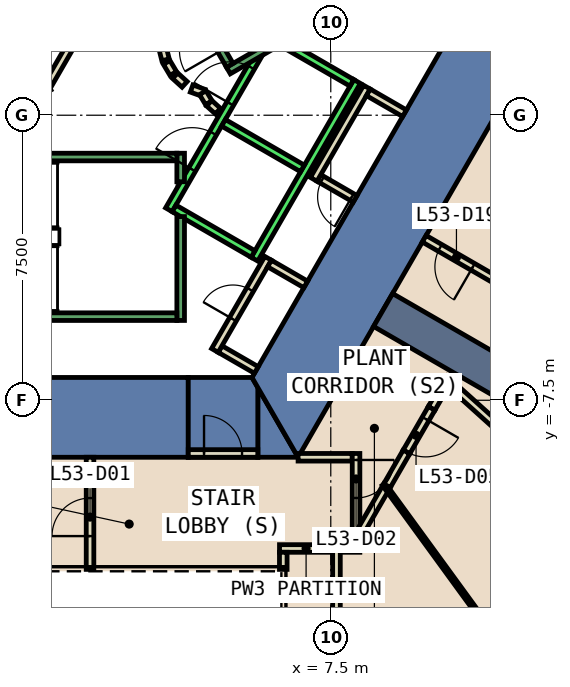
"""IFC4 building model, lengths in metres.
Left out: names, types, materials, properties, quantities, classifications, styles, units other than length and angle.
Written with IfcOpenShell. Run it as: python <this file> out.ifc"""

import sys

from ifc_helpers import new_model, si_unit, direction, frame, frame_2d, origin, place, context, subcontext, project, spatial, polyline, rectangle, outline, extrude, element, fill, save


model = new_model("IFC4")
c1 = context("Model", 3, precision=1e-05, world=origin(), true_north=direction((0.0, 1.0)))
c2 = subcontext(c1, "Body", "Model", "MODEL_VIEW")
j1 = project(units=[si_unit("LENGTHUNIT", "METRE"), si_unit("PLANEANGLEUNIT", "RADIAN")], contexts=[c1])
p1 = place(None, origin())
s1 = spatial("IfcSite", under=j1, at=p1, CompositionType="ELEMENT")
p2 = place(p1, origin())
s2 = spatial("IfcBuilding", under=s1, at=p2, CompositionType="ELEMENT")
p3 = place(p2, frame((0.0, 0.0, 236.0)))
s3 = spatial("IfcBuildingStorey", under=s2, at=p3, CompositionType="ELEMENT", Elevation=236.0)
p4 = place(p3, frame((0.0, 0.0, -0.6)))
e1 = element("IfcWall", 1, at=p4, inside=s3, PredefinedType="SHEAR", context=c2, shape_type="SweptSolid", body=[
    extrude(outline(polyline([(3.75, -9.0), (3.75, -6.9), (-5.427, -6.9), (-6.64, -9.0), (3.75, -9.0)])), origin(), (0.0, 0.0, 1.0), 5.4),
])
p5 = place(p3, frame((0.0, 0.0, -0.6)))
e2 = element("IfcWall", 2, at=p5, inside=s3, PredefinedType="SHEAR", context=c2, shape_type="SweptSolid", body=[
    extrude(outline(polyline([(5.58, -7.165), (5.58, -9.0), (6.64, -9.0), (5.58, -7.165)])), origin(), (0.0, 0.0, 1.0), 5.4),
])
p6 = place(p3, frame((0.0, 0.0, 3.6)))
e3 = element("IfcWall", 3, at=p6, inside=s3, PredefinedType="SHEAR", context=c2, shape_type="SweptSolid", body=[
    extrude(outline(polyline([(5.58, -9.0), (5.58, -7.165), (5.427, -6.9), (3.75, -6.9), (3.75, -9.0), (5.58, -9.0)])), origin(), (0.0, 0.0, 1.0), 1.2),
])
p7 = place(p3, frame((0.0, 0.0, -0.6)))
e4 = element("IfcWall", 4, at=p7, inside=s3, PredefinedType="SHEAR", context=c2, shape_type="SweptSolid", body=[
    extrude(outline(polyline([(6.64, -9.0), (13.279, 2.5), (10.854, 2.5), (5.427, -6.9), (6.64, -9.0)])), origin(), (0.0, 0.0, 1.0), 5.4),
])
p8 = place(p3, frame((8.877, -5.125, 0.0), z_axis=(0.0, 0.0, 1.0), x_axis=(0.866032640494, -0.499987465442, 0.0)))
e5 = element("IfcWall", 5, at=p8, inside=s3, PredefinedType="SHEAR", context=c2, shape_type="SweptSolid", body=[
    extrude(rectangle(XDim=23.232, YDim=1.0, at=frame_2d((11.616, 0.0))), origin(), (0.0, 0.0, 1.0), 4.8),
])
p9 = place(p3, frame((5.541, -6.703, 0.0), z_axis=(0.0, 0.0, 1.0), x_axis=(-0.86621513555, 0.499671230855, 0.0)))
e6 = element("IfcWall", 6, at=p9, inside=s3, PredefinedType="PARTITIONING", context=c2, shape_type="SweptSolid", body=[
    extrude(rectangle(XDim=1.1, YDim=0.2, at=frame_2d((0.55, 0.0))), origin(), (0.0, 0.0, 1.0), 4.8),
])
p10 = place(p3, frame((4.451, -6.19, 0.0), z_axis=(0.0, 0.0, 1.0), x_axis=(0.500011755427, 0.866018616679, 0.0)))
e7 = element("IfcWall", 7, at=p10, inside=s3, PredefinedType="PARTITIONING", context=c2, shape_type="SweptSolid", body=[
    extrude(rectangle(XDim=2.8, YDim=0.2, at=frame_2d((1.4, 0.0))), origin(), (0.0, 0.0, 1.0), 4.8),
])
p11 = place(p10, frame((0.95, 0.0, 0.0)))
e8 = element("IfcOpeningElement", 8, at=p11, cuts=e7, PredefinedType="OPENING", context=c2, shape_type="SweptSolid", body=[
    extrude(rectangle(XDim=0.9, YDim=2.1, at=frame_2d((0.45, 1.05))), frame((0.0, 0.11, 0.0), z_axis=(0.0, -1.0, 0.0), x_axis=(1.0, 0.0, 0.0)), (0.0, 0.0, 1.0), 0.22),
])
p12 = place(p3, frame((5.888, -3.902, 0.0), z_axis=(0.0, 0.0, 1.0), x_axis=(0.86621513555, -0.499671230855, 0.0)))
e9 = element("IfcWall", 9, at=p12, inside=s3, PredefinedType="PARTITIONING", context=c2, shape_type="SweptSolid", body=[
    extrude(rectangle(XDim=1.1, YDim=0.2, at=frame_2d((0.55, 0.0))), origin(), (0.0, 0.0, 1.0), 4.8),
])
p13 = place(p3, frame((8.14, -2.2, 0.0), z_axis=(0.0, 0.0, 1.0), x_axis=(-0.865841558281, 0.500318294642, 0.0)))
e10 = element("IfcWall", 10, at=p13, inside=s3, PredefinedType="PARTITIONING", context=c2, shape_type="SweptSolid", body=[
    extrude(rectangle(XDim=1.099, YDim=0.2, at=frame_2d((0.55, 0.0))), origin(), (0.0, 0.0, 1.0), 4.8),
])
p14 = place(p13, frame((0.1, 0.0, 0.0)))
e11 = element("IfcOpeningElement", 11, at=p14, cuts=e10, PredefinedType="OPENING", context=c2, shape_type="SweptSolid", body=[
    extrude(rectangle(XDim=0.9, YDim=2.1, at=frame_2d((0.45, 1.05))), frame((0.0, 0.11, 0.0), z_axis=(0.0, -1.0, 0.0), x_axis=(1.0, 0.0, 0.0)), (0.0, 0.0, 1.0), 0.22),
])
p15 = place(p3, frame((7.051, -1.687, 0.0), z_axis=(0.0, 0.0, 1.0), x_axis=(0.49994636267, 0.866056369097, 0.0)))
e12 = element("IfcWall", 12, at=p15, inside=s3, PredefinedType="PARTITIONING", context=c2, shape_type="SweptSolid", body=[
    extrude(rectangle(XDim=2.8, YDim=0.2, at=frame_2d((1.4, 0.0))), origin(), (0.0, 0.0, 1.0), 4.8),
])
p16 = place(p3, frame((8.488, 0.602, 0.0), z_axis=(0.0, 0.0, 1.0), x_axis=(0.866063652425, -0.499933745558, 0.0)))
e13 = element("IfcWall", 13, at=p16, inside=s3, PredefinedType="PARTITIONING", context=c2, shape_type="SweptSolid", body=[
    extrude(rectangle(XDim=1.1, YDim=0.2, at=frame_2d((0.55, 0.0))), origin(), (0.0, 0.0, 1.0), 4.8),
])
p17 = place(p3, frame((3.07, 1.786, 0.0), z_axis=(0.0, 0.0, 1.0), x_axis=(0.242705583207, -0.970099994784, 0.0)))
e14 = element("IfcWall", 14, at=p17, inside=s3, PredefinedType="PARTITIONING", context=c2, shape_type="SweptSolid", body=[
    extrude(rectangle(XDim=0.338, YDim=0.2, at=frame_2d((0.169, 0.0))), origin(), (0.0, 0.0, 1.0), 4.8),
])
for number, where, z_axis, x_axis in (
    (15, (3.182, 1.388, 0.0), (0.0, 0.0, 1.0), (0.512, -0.859, 0.0)),
    (16, (3.404, 1.039, 0.0), (0.0, 0.0, 1.0), (0.74, -0.672, 0.0)),
):
    element("IfcWall", number, at=place(p3, frame(where, z_axis=z_axis, x_axis=x_axis)), inside=s3, PredefinedType="PARTITIONING", context=c2, shape_type="SweptSolid", body=[
        extrude(rectangle(XDim=0.338, YDim=0.2, at=frame_2d((0.169, 0.0))), origin(), (0.0, 0.0, 1.0), 4.8),
    ])
p18 = place(p3, frame((3.838, 0.702, 0.0), z_axis=(0.0, 0.0, 1.0), x_axis=(0.941035081519, -0.338308993895, 0.0)))
e17 = element("IfcWall", 17, at=p18, inside=s3, PredefinedType="PARTITIONING", context=c2, shape_type="SweptSolid", body=[
    extrude(rectangle(XDim=0.337, YDim=0.2, at=frame_2d((0.168, 0.0))), origin(), (0.0, 0.0, 1.0), 4.8),
])
p19 = place(p3, frame((4.132, 0.593, 0.0), z_axis=(0.0, 0.0, 1.0), x_axis=(0.513561617048, -0.858052717201, 0.0)))
e18 = element("IfcWall", 18, at=p19, inside=s3, PredefinedType="PARTITIONING", context=c2, shape_type="SweptSolid", body=[
    extrude(rectangle(XDim=0.308, YDim=0.2, at=frame_2d((0.154, 0.0))), origin(), (0.0, 0.0, 1.0), 4.8),
])
p20 = place(p3, frame((4.301, 0.315, 0.0), z_axis=(0.0, 0.0, 1.0), x_axis=(0.741798017506, -0.670623367639, 0.0)))
e19 = element("IfcWall", 19, at=p20, inside=s3, PredefinedType="PARTITIONING", context=c2, shape_type="SweptSolid", body=[
    extrude(rectangle(XDim=0.309, YDim=0.2, at=frame_2d((0.154, 0.0))), origin(), (0.0, 0.0, 1.0), 4.8),
])
p21 = place(p3, frame((0.05, 0.787, 0.0), z_axis=(0.0, 0.0, 1.0), x_axis=(0.499954076797, 0.866051915934, 0.0)))
e20 = element("IfcWall", 20, at=p21, inside=s3, PredefinedType="PARTITIONING", context=c2, shape_type="SweptSolid", body=[
    extrude(rectangle(XDim=3.558, YDim=0.2, at=frame_2d((1.779, 0.0))), origin(), (0.0, 0.0, 1.0), 4.8),
])
p22 = place(p21, frame((1.229, 0.0, 0.0)))
e21 = element("IfcOpeningElement", 21, at=p22, cuts=e20, PredefinedType="OPENING", context=c2, shape_type="SweptSolid", body=[
    extrude(rectangle(XDim=1.0, YDim=2.1, at=frame_2d((0.5, 1.05))), frame((0.0, 0.11, 0.0), z_axis=(0.0, -1.0, 0.0), x_axis=(1.0, 0.0, 0.0)), (0.0, 0.0, 1.0), 0.22),
])
p23 = place(p3, frame((1.165, -11.95, 0.0), z_axis=(0.0, 0.0, 1.0), x_axis=(0.0, 1.0, 0.0)))
e22 = element("IfcWall", 22, at=p23, inside=s3, PredefinedType="PARTITIONING", context=c2, shape_type="SweptSolid", body=[
    extrude(rectangle(XDim=2.95, YDim=0.2, at=frame_2d((1.475, 0.0))), origin(), (0.0, 0.0, 1.0), 4.8),
])
p24 = place(p23, frame((0.876, 0.0, 0.0)))
e23 = element("IfcOpeningElement", 23, at=p24, cuts=e22, PredefinedType="OPENING", context=c2, shape_type="SweptSolid", body=[
    extrude(rectangle(XDim=1.0, YDim=2.1, at=frame_2d((0.5, 1.05))), frame((0.0, 0.11, 0.0), z_axis=(0.0, -1.0, 0.0), x_axis=(1.0, 0.0, 0.0)), (0.0, 0.0, 1.0), 0.22),
])
p25 = place(p3, frame((7.55, -11.4, 0.0), z_axis=(0.0, 0.0, 1.0), x_axis=(-1.0, 0.0, 0.0)))
e24 = element("IfcWall", 24, at=p25, inside=s3, PredefinedType="PARTITIONING", context=c2, shape_type="SweptSolid", body=[
    extrude(rectangle(XDim=1.399, YDim=0.2, at=frame_2d((0.7, 0.0))), origin(), (0.0, 0.0, 1.0), 4.8),
])
p26 = place(p3, frame((6.25, -11.5, 0.0), z_axis=(0.0, 0.0, 1.0), x_axis=(0.0, -1.0, 0.0)))
e25 = element("IfcWall", 25, at=p26, inside=s3, PredefinedType="PARTITIONING", context=c2, shape_type="SweptSolid", body=[
    extrude(rectangle(XDim=0.45, YDim=0.2, at=frame_2d((0.225, 0.0))), origin(), (0.0, 0.0, 1.0), 4.8),
])
p27 = place(p3, frame((6.64, -9.0, 0.0), z_axis=(0.0, 0.0, 1.0), x_axis=(1.0, 0.0, 0.0)))
e26 = element("IfcWall", 26, at=p27, inside=s3, PredefinedType="PARTITIONING", context=c2, shape_type="SweptSolid", body=[
    extrude(rectangle(XDim=1.425, YDim=0.2, at=frame_2d((0.712, 0.0))), origin(), (0.0, 0.0, 1.0), 4.8),
])
p28 = place(p3, frame((8.165, -8.9, 0.0), z_axis=(0.0, 0.0, 1.0), x_axis=(0.0, -1.0, 0.0)))
e27 = element("IfcWall", 27, at=p28, inside=s3, PredefinedType="PARTITIONING", context=c2, shape_type="SweptSolid", body=[
    extrude(rectangle(XDim=2.359, YDim=0.2, at=frame_2d((1.18, 0.0))), origin(), (0.0, 0.0, 1.0), 4.8),
])
p29 = place(p28, frame((0.171, 0.0, 0.0)))
e28 = element("IfcOpeningElement", 28, at=p29, cuts=e27, PredefinedType="OPENING", context=c2, shape_type="SweptSolid", body=[
    extrude(rectangle(XDim=1.0, YDim=2.1, at=frame_2d((0.5, 1.05))), frame((0.0, 0.11, 0.0), z_axis=(0.0, -1.0, 0.0), x_axis=(1.0, 0.0, 0.0)), (0.0, 0.0, 1.0), 0.22),
])
p30 = place(p3, frame((8.265, -11.4, 0.0), z_axis=(0.0, 0.0, 1.0), x_axis=(-1.0, 0.0, 0.0)))
e29 = element("IfcWall", 29, at=p30, inside=s3, PredefinedType="PARTITIONING", context=c2, shape_type="SweptSolid", body=[
    extrude(rectangle(XDim=0.515, YDim=0.2, at=frame_2d((0.257, 0.0))), origin(), (0.0, 0.0, 1.0), 4.8),
])
p31 = place(p3, frame((7.65, -11.3, 0.0), z_axis=(0.0, 0.0, 1.0), x_axis=(0.0, -1.0, 0.0)))
e30 = element("IfcWall", 30, at=p31, inside=s3, PredefinedType="PARTITIONING", context=c2, shape_type="SweptSolid", body=[
    extrude(rectangle(XDim=5.465, YDim=0.2, at=frame_2d((2.732, 0.0))), origin(), (0.0, 0.0, 1.0), 4.8),
])
p32 = place(p3, frame((8.98, -9.747, 0.0), z_axis=(0.0, 0.0, 1.0), x_axis=(-0.499908274205, -0.866078355221, 0.0)))
e31 = element("IfcWall", 31, at=p32, inside=s3, PredefinedType="PARTITIONING", context=c2, shape_type="SweptSolid", body=[
    extrude(rectangle(XDim=1.63, YDim=0.2, at=frame_2d((0.815, 0.0))), origin(), (0.0, 0.0, 1.0), 4.8),
])
p33 = place(p3, frame((10.566, -7.0, 0.0), z_axis=(0.0, 0.0, 1.0), x_axis=(-0.500252895651, -0.86587934517, 0.0)))
e32 = element("IfcWall", 32, at=p33, inside=s3, PredefinedType="PARTITIONING", context=c2, shape_type="SweptSolid", body=[
    extrude(rectangle(XDim=0.823, YDim=0.2, at=frame_2d((0.412, 0.0))), origin(), (0.0, 0.0, 1.0), 2.4),
])
p34 = place(p3, frame((8.896, -9.709, 0.0), z_axis=(0.0, 0.0, 1.0), x_axis=(0.588922600502, -0.808189439808, 0.0)))
e33 = element("IfcWall", 33, at=p34, inside=s3, PredefinedType="PARTITIONING", context=c2, shape_type="SweptSolid", body=[
    extrude(rectangle(XDim=16.369, YDim=0.1, at=frame_2d((8.184, 0.0))), origin(), (0.0, 0.0, 1.0), 4.8),
])
p35 = place(p3, frame((10.492, -6.933, 0.0), z_axis=(0.0, 0.0, 1.0), x_axis=(0.743607411776, -0.668616494825, 0.0)))
e34 = element("IfcWall", 34, at=p35, inside=s3, PredefinedType="PARTITIONING", context=c2, shape_type="SweptSolid", body=[
    extrude(rectangle(XDim=9.685, YDim=0.2, at=frame_2d((4.843, 0.0))), origin(), (0.0, 0.0, 1.0), 2.4),
])
p36 = place(p3, frame((11.951, -4.4, 0.0), z_axis=(0.0, 0.0, 1.0), x_axis=(-0.866053019151, 0.499952165731, 0.0)))
e35 = element("IfcWall", 35, at=p36, inside=s3, PredefinedType="PARTITIONING", context=c2, shape_type="SweptSolid", body=[
    extrude(rectangle(XDim=2.3, YDim=0.2, at=frame_2d((1.15, 0.0))), origin(), (0.0, 0.0, 1.0), 4.8),
])
p37 = place(p36, frame((0.821, 0.0, 0.0)))
e36 = element("IfcOpeningElement", 36, at=p37, cuts=e35, PredefinedType="OPENING", context=c2, shape_type="SweptSolid", body=[
    extrude(rectangle(XDim=1.0, YDim=2.1, at=frame_2d((0.5, 1.05))), frame((0.0, 0.11, 0.0), z_axis=(0.0, -1.0, 0.0), x_axis=(1.0, 0.0, 0.0)), (0.0, 0.0, 1.0), 0.22),
])
p38 = place(p3, frame((3.75, -8.9, 0.0), z_axis=(0.0, 0.0, 1.0), x_axis=(1.0, 0.0, 0.0)))
e37 = element("IfcWall", 37, at=p38, inside=s3, PredefinedType="PARTITIONING", context=c2, shape_type="SweptSolid", body=[
    extrude(rectangle(XDim=1.83, YDim=0.2, at=frame_2d((0.915, 0.0))), origin(), (0.0, 0.0, 1.0), 2.4),
])
p39 = place(p38, frame((0.415, 0.0, 0.0)))
e38 = element("IfcOpeningElement", 38, at=p39, cuts=e37, PredefinedType="OPENING", context=c2, shape_type="SweptSolid", body=[
    extrude(rectangle(XDim=1.0, YDim=2.1, at=frame_2d((0.5, 1.05))), frame((0.0, 0.11, 0.0), z_axis=(0.0, -1.0, 0.0), x_axis=(1.0, 0.0, 0.0)), (0.0, 0.0, 1.0), 0.22),
])
p40 = place(p3, frame((10.154, -7.713, 0.0), z_axis=(0.0, 0.0, 1.0), x_axis=(-0.500265304803, -0.865872175792, 0.0)))
e39 = element("IfcWall", 39, at=p40, inside=s3, PredefinedType="PARTITIONING", context=c2, shape_type="SweptSolid", body=[
    extrude(rectangle(XDim=1.323, YDim=0.2, at=frame_2d((0.662, 0.0))), origin(), (0.0, 0.0, 1.0), 4.8),
])
p41 = place(p40, frame((0.32, 0.0, 0.0)))
e40 = element("IfcOpeningElement", 40, at=p41, cuts=e39, PredefinedType="OPENING", context=c2, shape_type="SweptSolid", body=[
    extrude(rectangle(XDim=1.0, YDim=2.1, at=frame_2d((0.5, 1.05))), frame((0.0, 0.11, 0.0), z_axis=(0.0, -1.0, 0.0), x_axis=(1.0, 0.0, 0.0)), (0.0, 0.0, 1.0), 0.22),
])
p42 = place(p3, frame((9.492, -8.859, 0.0), z_axis=(0.0, 0.0, 1.0), x_axis=(-0.499392554388, -0.866375828738, 0.0)))
e41 = element("IfcWall", 41, at=p42, inside=s3, PredefinedType="PARTITIONING", context=c2, shape_type="SweptSolid", body=[
    extrude(rectangle(XDim=1.025, YDim=0.2, at=frame_2d((0.513, 0.0))), origin(), (0.0, 0.0, 1.0), 2.4),
])
p43 = place(p3, frame((3.24, -2.488, 0.0), z_axis=(0.0, 0.0, 1.0), x_axis=(0.500034260056, 0.866005622828, 0.0)))
e42 = element("IfcWall", 42, at=p43, inside=s3, PredefinedType="STANDARD", context=c2, shape_type="SweptSolid", body=[
    extrude(rectangle(XDim=5.399, YDim=0.2, at=frame_2d((2.7, 0.0))), origin(), (0.0, 0.0, 1.0), 4.8),
])
p44 = place(p43, frame((3.225, 0.0, 0.0)))
e43 = element("IfcOpeningElement", 43, at=p44, cuts=e42, PredefinedType="OPENING", context=c2, shape_type="SweptSolid", body=[
    extrude(rectangle(XDim=1.1, YDim=2.1, at=frame_2d((0.55, 1.05))), frame((0.0, 0.11, 0.0), z_axis=(0.0, -1.0, 0.0), x_axis=(1.0, 0.0, 0.0)), (0.0, 0.0, 1.0), 0.22),
])
p45 = place(p43, frame((1.225, 0.0, 0.0)))
e44 = element("IfcOpeningElement", 44, at=p45, cuts=e42, PredefinedType="OPENING", context=c2, shape_type="SweptSolid", body=[
    extrude(rectangle(XDim=1.1, YDim=2.1, at=frame_2d((0.55, 1.05))), frame((0.0, 0.11, 0.0), z_axis=(0.0, -1.0, 0.0), x_axis=(1.0, 0.0, 0.0)), (0.0, 0.0, 1.0), 0.22),
])
p46 = place(p3, frame((5.492, -3.788, 0.0), z_axis=(0.0, 0.0, 1.0), x_axis=(0.500034260056, 0.866005622828, 0.0)))
e45 = element("IfcWall", 45, at=p46, inside=s3, PredefinedType="STANDARD", context=c2, shape_type="SweptSolid", body=[
    extrude(rectangle(XDim=5.399, YDim=0.2, at=frame_2d((2.7, 0.0))), origin(), (0.0, 0.0, 1.0), 4.8),
])
p47 = place(p3, frame((3.377, -2.452, 0.0), z_axis=(0.0, 0.0, 1.0), x_axis=(0.865955154139, -0.50012165622, 0.0)))
e46 = element("IfcWall", 46, at=p47, inside=s3, PredefinedType="STANDARD", context=c2, shape_type="SweptSolid", body=[
    extrude(rectangle(XDim=2.4, YDim=0.2, at=frame_2d((1.2, 0.0))), origin(), (0.0, 0.0, 1.0), 4.8),
])
for number, where, z_axis, x_axis in (
    (47, (4.677, -0.2, 0.0), (0.0, 0.0, 1.0), (0.866, -0.5, 0.0)),
    (48, (5.977, 2.052, 0.0), (0.0, 0.0, 1.0), (0.866, -0.5, 0.0)),
):
    element("IfcWall", number, at=place(p3, frame(where, z_axis=z_axis, x_axis=x_axis)), inside=s3, PredefinedType="STANDARD", context=c2, shape_type="SweptSolid", body=[
        extrude(rectangle(XDim=2.399, YDim=0.2, at=frame_2d((1.2, 0.0))), origin(), (0.0, 0.0, 1.0), 4.8),
    ])
p48 = place(p3, frame((3.55, -2.667, 0.0), z_axis=(0.0, 0.0, 1.0), x_axis=(0.0, -1.0, 0.0)))
e49 = element("IfcWall", 49, at=p48, inside=s3, PredefinedType="STANDARD", context=c2, shape_type="SweptSolid", body=[
    extrude(rectangle(XDim=2.733, YDim=0.2, at=frame_2d((1.366, 0.0))), origin(), (0.0, 0.0, 1.0), 4.8),
])
p49 = place(p3, frame((3.55, -1.0, 0.0), z_axis=(0.0, 0.0, 1.0), x_axis=(0.0, -1.0, 0.0)))
e50 = element("IfcWall", 50, at=p49, inside=s3, PredefinedType="STANDARD", context=c2, shape_type="SweptSolid", body=[
    extrude(rectangle(XDim=0.751, YDim=0.2, at=frame_2d((0.375, 0.0))), origin(), (0.0, 0.0, 1.0), 4.8),
])
p50 = place(p3, frame((-3.45, -1.1, 0.0), z_axis=(0.0, 0.0, 1.0), x_axis=(1.0, 0.0, 0.0)))
e51 = element("IfcWall", 51, at=p50, inside=s3, PredefinedType="STANDARD", context=c2, shape_type="SweptSolid", body=[
    extrude(rectangle(XDim=6.9, YDim=0.2, at=frame_2d((3.45, 0.0))), origin(), (0.0, 0.0, 1.0), 4.8),
])
p51 = place(p50, frame((0.45, 0.0, 0.0)))
e52 = element("IfcOpeningElement", 52, at=p51, cuts=e51, PredefinedType="OPENING", context=c2, shape_type="SweptSolid", body=[
    extrude(rectangle(XDim=1.1, YDim=2.2, at=frame_2d((0.55, 1.1))), frame((0.0, 0.11, 0.0), z_axis=(0.0, -1.0, 0.0), x_axis=(1.0, 0.0, 0.0)), (0.0, 0.0, 1.0), 0.22),
])
p52 = place(p3, frame((-3.45, -5.3, 0.0), z_axis=(0.0, 0.0, 1.0), x_axis=(1.0, 0.0, 0.0)))
e53 = element("IfcWall", 53, at=p52, inside=s3, PredefinedType="STANDARD", context=c2, shape_type="SweptSolid", body=[
    extrude(rectangle(XDim=6.9, YDim=0.2, at=frame_2d((3.45, 0.0))), origin(), (0.0, 0.0, 1.0), 4.8),
])
p53 = place(p3, frame((4.806, 1.176, 0.0), z_axis=(0.0, 0.0, 1.0), x_axis=(0.866059941101, 0.499940174841, 0.0)))
e54 = element("IfcWall", 54, at=p53, inside=s3, PredefinedType="STANDARD", context=c2, shape_type="SweptSolid", body=[
    extrude(rectangle(XDim=4.4, YDim=0.2, at=frame_2d((2.2, 0.0))), origin(), (0.0, 0.0, 1.0), 4.8),
])
p54 = place(p53, frame((2.4, 0.0, 0.0)))
e55 = element("IfcOpeningElement", 55, at=p54, cuts=e54, PredefinedType="OPENING", context=c2, shape_type="SweptSolid", body=[
    extrude(rectangle(XDim=1.1, YDim=2.2, at=frame_2d((0.55, 1.1))), frame((0.0, 0.11, 0.0), z_axis=(0.0, -1.0, 0.0), x_axis=(1.0, 0.0, 0.0)), (0.0, 0.0, 1.0), 0.22),
])
p55 = place(p3, frame((4.843, 1.312, 0.0), z_axis=(0.0, 0.0, 1.0), x_axis=(-0.499963383562, 0.866046543262, 0.0)))
e56 = element("IfcWall", 56, at=p55, inside=s3, PredefinedType="STANDARD", context=c2, shape_type="SweptSolid", body=[
    extrude(rectangle(XDim=6.9, YDim=0.2, at=frame_2d((3.45, 0.0))), origin(), (0.0, 0.0, 1.0), 4.8),
])
p56 = place(p55, frame((0.45, 0.0, 0.0)))
e57 = element("IfcOpeningElement", 57, at=p56, cuts=e56, PredefinedType="OPENING", context=c2, shape_type="SweptSolid", body=[
    extrude(rectangle(XDim=1.1, YDim=2.2, at=frame_2d((0.55, 1.1))), frame((0.0, 0.11, 0.0), z_axis=(0.0, -1.0, 0.0), x_axis=(1.0, 0.0, 0.0)), (0.0, 0.0, 1.0), 0.22),
])
p57 = place(p24, origin())
e58 = element("IfcDoor", 58, at=p57, inside=s3, OperationType="SINGLE_SWING_LEFT", PredefinedType="DOOR", context=c2, shape_type="SweptSolid", body=[
    extrude(rectangle(XDim=1.0, YDim=2.1, at=frame_2d((0.5, 1.05))), frame((0.0, 0.025, 0.0), z_axis=(0.0, -1.0, 0.0), x_axis=(1.0, 0.0, 0.0)), (0.0, 0.0, 1.0), 0.05),
])
fill(e23, e58)
p58 = place(p29, origin())
e59 = element("IfcDoor", 59, at=p58, inside=s3, OperationType="SINGLE_SWING_RIGHT", PredefinedType="DOOR", context=c2, shape_type="SweptSolid", body=[
    extrude(rectangle(XDim=1.0, YDim=2.1, at=frame_2d((0.5, 1.05))), frame((0.0, 0.025, 0.0), z_axis=(0.0, -1.0, 0.0), x_axis=(1.0, 0.0, 0.0)), (0.0, 0.0, 1.0), 0.05),
])
fill(e28, e59)
p59 = place(p41, origin())
e60 = element("IfcDoor", 60, at=p59, inside=s3, OperationType="SINGLE_SWING_LEFT", PredefinedType="DOOR", context=c2, shape_type="SweptSolid", body=[
    extrude(rectangle(XDim=1.0, YDim=2.1, at=frame_2d((0.5, 1.05))), frame((0.0, 0.025, 0.0), z_axis=(0.0, -1.0, 0.0), x_axis=(1.0, 0.0, 0.0)), (0.0, 0.0, 1.0), 0.05),
])
fill(e40, e60)
p60 = place(p37, origin())
e61 = element("IfcDoor", 61, at=p60, inside=s3, OperationType="SINGLE_SWING_LEFT", PredefinedType="DOOR", context=c2, shape_type="SweptSolid", body=[
    extrude(rectangle(XDim=1.0, YDim=2.1, at=frame_2d((0.5, 1.05))), frame((0.0, 0.025, 0.0), z_axis=(0.0, -1.0, 0.0), x_axis=(1.0, 0.0, 0.0)), (0.0, 0.0, 1.0), 0.05),
])
fill(e36, e61)
p61 = place(p11, origin())
e62 = element("IfcDoor", 62, at=p61, inside=s3, OperationType="SINGLE_SWING_LEFT", PredefinedType="DOOR", context=c2, shape_type="SweptSolid", body=[
    extrude(rectangle(XDim=0.9, YDim=2.1, at=frame_2d((0.45, 1.05))), frame((0.0, 0.025, 0.0), z_axis=(0.0, -1.0, 0.0), x_axis=(1.0, 0.0, 0.0)), (0.0, 0.0, 1.0), 0.05),
])
fill(e8, e62)
p62 = place(p14, origin())
e63 = element("IfcDoor", 63, at=p62, inside=s3, OperationType="SINGLE_SWING_RIGHT", PredefinedType="DOOR", context=c2, shape_type="SweptSolid", body=[
    extrude(rectangle(XDim=0.9, YDim=2.1, at=frame_2d((0.45, 1.05))), frame((0.0, 0.025, 0.0), z_axis=(0.0, -1.0, 0.0), x_axis=(1.0, 0.0, 0.0)), (0.0, 0.0, 1.0), 0.05),
])
fill(e11, e63)
p63 = place(p39, origin())
e64 = element("IfcDoor", 64, at=p63, inside=s3, OperationType="SINGLE_SWING_LEFT", PredefinedType="DOOR", context=c2, shape_type="SweptSolid", body=[
    extrude(rectangle(XDim=1.0, YDim=2.1, at=frame_2d((0.5, 1.05))), frame((0.0, 0.025, 0.0), z_axis=(0.0, -1.0, 0.0), x_axis=(1.0, 0.0, 0.0)), (0.0, 0.0, 1.0), 0.05),
])
fill(e38, e64)
p64 = place(p44, origin())
e65 = element("IfcDoor", 65, at=p64, inside=s3, OperationType="SLIDING_TO_LEFT", PredefinedType="DOOR", context=c2, shape_type="SweptSolid", body=[
    extrude(rectangle(XDim=1.1, YDim=2.1, at=frame_2d((0.55, 1.05))), frame((0.0, 0.025, 0.0), z_axis=(0.0, -1.0, 0.0), x_axis=(1.0, 0.0, 0.0)), (0.0, 0.0, 1.0), 0.05),
])
fill(e43, e65)
p65 = place(p45, origin())
e66 = element("IfcDoor", 66, at=p65, inside=s3, OperationType="SLIDING_TO_LEFT", PredefinedType="DOOR", context=c2, shape_type="SweptSolid", body=[
    extrude(rectangle(XDim=1.1, YDim=2.1, at=frame_2d((0.55, 1.05))), frame((0.0, 0.025, 0.0), z_axis=(0.0, -1.0, 0.0), x_axis=(1.0, 0.0, 0.0)), (0.0, 0.0, 1.0), 0.05),
])
fill(e44, e66)
save(model, sys.argv[1])
